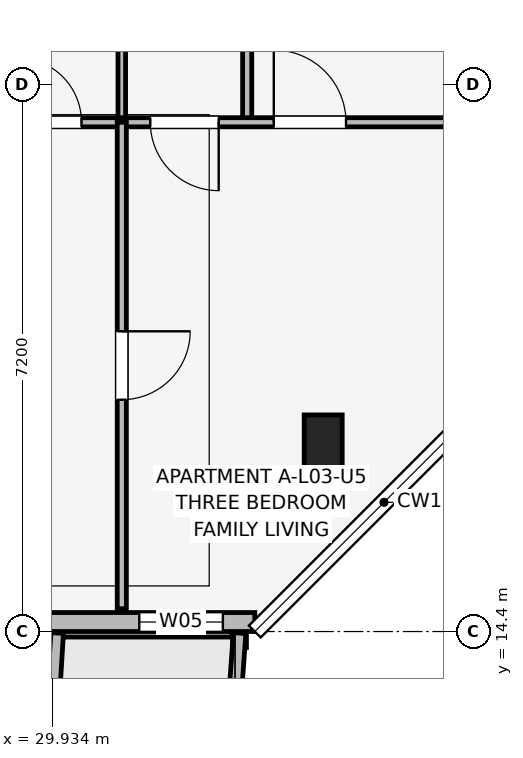
"""IFC4 building model, lengths in metres.
Left out: names, types, materials, properties, quantities, classifications, styles, units other than length and angle.
Written with IfcOpenShell. Run it as: python <this file> out.ifc"""

import sys

from ifc_helpers import new_model, si_unit, direction, frame, frame_2d, origin, origin_2d, place, context, subcontext, project, spatial, rectangle, extrude, element, fill, save


model = new_model("IFC4")
c1 = context("Model", 3, precision=1e-05, world=origin(), true_north=direction((0.0, 1.0)))
c2 = subcontext(c1, "Body", "Model", "MODEL_VIEW")
j1 = project(units=[si_unit("LENGTHUNIT", "METRE"), si_unit("PLANEANGLEUNIT", "RADIAN")], contexts=[c1])
p1 = place(None, origin())
s1 = spatial("IfcSite", under=j1, at=p1, CompositionType="ELEMENT")
p2 = place(p1, origin())
s2 = spatial("IfcBuilding", under=s1, at=p2, CompositionType="ELEMENT")
p3 = place(p2, frame((0.0, 0.0, 11.85)))
s3 = spatial("IfcBuildingStorey", under=s2, at=p3, CompositionType="ELEMENT", Elevation=11.85)
p4 = place(p3, frame((33.5, 16.9, 0.0), z_axis=(0.0, 0.0, 1.0), x_axis=(1.0, 0.0, 0.0)))
e1 = element("IfcColumn", 1, at=p4, inside=s3, PredefinedType="COLUMN", context=c2, shape_type="SweptSolid", body=[
    extrude(rectangle(XDim=0.5, YDim=0.7, at=origin_2d()), origin(), (0.0, 0.0, 1.0), 3.15),
])
p5 = place(p3, frame((3.4, 14.525, 0.0), z_axis=(0.0, 0.0, 1.0), x_axis=(1.0, 0.0, 0.0)))
e2 = element("IfcWall", 2, at=p5, inside=s3, PredefinedType="SOLIDWALL", context=c2, shape_type="SweptSolid", body=[
    extrude(rectangle(XDim=29.2, YDim=0.25, at=frame_2d((14.6, 0.0))), origin(), (0.0, 0.0, 1.0), 2.43),
])
p6 = place(p5, frame((9.5, 0.0, 0.0), z_axis=(0.0, 0.0, 1.0), x_axis=(-1.0, 0.0, 0.0)))
e3 = element("IfcOpeningElement", 3, at=p6, cuts=e2, PredefinedType="OPENING", context=c2, shape_type="SweptSolid", body=[
    extrude(rectangle(XDim=1.8, YDim=2.15, at=frame_2d((0.9, 1.075))), frame((0.0, 0.135, 0.0), z_axis=(0.0, -1.0, 0.0), x_axis=(1.0, 0.0, 0.0)), (0.0, 0.0, 1.0), 0.27),
])
p7 = place(p5, frame((23.825, 0.0, 0.0), z_axis=(0.0, 0.0, 1.0), x_axis=(-1.0, 0.0, 0.0)))
e4 = element("IfcOpeningElement", 4, at=p7, cuts=e2, PredefinedType="OPENING", context=c2, shape_type="SweptSolid", body=[
    extrude(rectangle(XDim=1.65, YDim=2.15, at=frame_2d((0.825, 1.075))), frame((0.0, 0.135, 0.0), z_axis=(0.0, -1.0, 0.0), x_axis=(1.0, 0.0, 0.0)), (0.0, 0.0, 1.0), 0.27),
])
p8 = place(p5, frame((2.755, 0.0, 0.75)))
e5 = element("IfcOpeningElement", 5, at=p8, cuts=e2, PredefinedType="OPENING", context=c2, shape_type="SweptSolid", body=[
    extrude(rectangle(XDim=0.6, YDim=1.25, at=frame_2d((0.3, 0.625))), frame((0.0, 0.135, 0.0), z_axis=(0.0, -1.0, 0.0), x_axis=(1.0, 0.0, 0.0)), (0.0, 0.0, 1.0), 0.27),
])
p9 = place(p5, frame((4.245, 0.0, 0.75)))
e6 = element("IfcOpeningElement", 6, at=p9, cuts=e2, PredefinedType="OPENING", context=c2, shape_type="SweptSolid", body=[
    extrude(rectangle(XDim=0.6, YDim=1.25, at=frame_2d((0.3, 0.625))), frame((0.0, 0.135, 0.0), z_axis=(0.0, -1.0, 0.0), x_axis=(1.0, 0.0, 0.0)), (0.0, 0.0, 1.0), 0.27),
])
p10 = place(p5, frame((12.54, 0.0, 0.7)))
e7 = element("IfcOpeningElement", 7, at=p10, cuts=e2, PredefinedType="OPENING", context=c2, shape_type="SweptSolid", body=[
    extrude(rectangle(XDim=1.72, YDim=1.6, at=frame_2d((0.86, 0.8))), frame((0.0, 0.135, 0.0), z_axis=(0.0, -1.0, 0.0), x_axis=(1.0, 0.0, 0.0)), (0.0, 0.0, 1.0), 0.27),
])
p11 = place(p5, frame((15.765, 0.0, 0.75)))
e8 = element("IfcOpeningElement", 8, at=p11, cuts=e2, PredefinedType="OPENING", context=c2, shape_type="SweptSolid", body=[
    extrude(rectangle(XDim=0.72, YDim=1.35, at=frame_2d((0.36, 0.675))), frame((0.0, 0.135, 0.0), z_axis=(0.0, -1.0, 0.0), x_axis=(1.0, 0.0, 0.0)), (0.0, 0.0, 1.0), 0.27),
])
p12 = place(p5, frame((19.555, 0.0, 0.75)))
e9 = element("IfcOpeningElement", 9, at=p12, cuts=e2, PredefinedType="OPENING", context=c2, shape_type="SweptSolid", body=[
    extrude(rectangle(XDim=0.72, YDim=1.35, at=frame_2d((0.36, 0.675))), frame((0.0, 0.135, 0.0), z_axis=(0.0, -1.0, 0.0), x_axis=(1.0, 0.0, 0.0)), (0.0, 0.0, 1.0), 0.27),
])
p13 = place(p5, frame((25.845, 0.0, 0.75)))
e10 = element("IfcOpeningElement", 10, at=p13, cuts=e2, PredefinedType="OPENING", context=c2, shape_type="SweptSolid", body=[
    extrude(rectangle(XDim=0.6, YDim=1.25, at=frame_2d((0.3, 0.625))), frame((0.0, 0.135, 0.0), z_axis=(0.0, -1.0, 0.0), x_axis=(1.0, 0.0, 0.0)), (0.0, 0.0, 1.0), 0.27),
])
p14 = place(p5, frame((27.68, 0.0, 0.75)))
e11 = element("IfcOpeningElement", 11, at=p14, cuts=e2, PredefinedType="OPENING", context=c2, shape_type="SweptSolid", body=[
    extrude(rectangle(XDim=1.1, YDim=1.5, at=frame_2d((0.55, 0.75))), frame((0.0, 0.135, 0.0), z_axis=(0.0, -1.0, 0.0), x_axis=(1.0, 0.0, 0.0)), (0.0, 0.0, 1.0), 0.27),
])
p15 = place(p3, frame((30.0, 14.38, 0.0), z_axis=(0.0, 0.0, 1.0), x_axis=(-0.061170732449, -0.998127317276, 0.0)))
e12 = element("IfcWall", 12, at=p15, inside=s3, PredefinedType="ELEMENTEDWALL", context=c2, shape_type="SweptSolid", body=[
    extrude(rectangle(XDim=1.964, YDim=0.165, at=frame_2d((0.982, 0.0))), origin(), (0.0, 0.0, 1.0), 2.95),
])
p16 = place(p3, frame((32.4, 14.38, 0.0), z_axis=(0.0, 0.0, 1.0), x_axis=(-0.071194071069, -0.997462482625, 0.0)))
e13 = element("IfcWall", 13, at=p16, inside=s3, PredefinedType="ELEMENTEDWALL", context=c2, shape_type="SweptSolid", body=[
    extrude(rectangle(XDim=1.965, YDim=0.165, at=frame_2d((0.982, 0.0))), origin(), (0.0, 0.0, 1.0), 2.95),
])
p17 = place(p3, frame((30.85, 21.1, 0.0), z_axis=(0.0, 0.0, 1.0), x_axis=(0.0, 1.0, 0.0)))
e14 = element("IfcWall", 14, at=p17, inside=s3, PredefinedType="PARTITIONING", context=c2, shape_type="SweptSolid", body=[
    extrude(rectangle(XDim=3.2, YDim=0.1, at=frame_2d((1.6, 0.0))), origin(), (0.0, 0.0, 1.0), 2.375),
])
p18 = place(p3, frame((32.5, 21.1, 0.0), z_axis=(0.0, 0.0, 1.0), x_axis=(0.0, 1.0, 0.0)))
e15 = element("IfcWall", 15, at=p18, inside=s3, PredefinedType="PARTITIONING", context=c2, shape_type="SweptSolid", body=[
    extrude(rectangle(XDim=3.2, YDim=0.12, at=frame_2d((1.6, 0.0))), origin(), (0.0, 0.0, 1.0), 2.375),
])
p19 = place(p3, frame((28.94, 21.1, 0.0), z_axis=(0.0, 0.0, 1.0), x_axis=(1.0, 0.0, 0.0)))
e16 = element("IfcWall", 16, at=p19, inside=s3, PredefinedType="PARTITIONING", context=c2, shape_type="SweptSolid", body=[
    extrude(rectangle(XDim=6.92, YDim=0.12, at=frame_2d((3.46, 0.0))), origin(), (0.0, 0.0, 1.0), 2.38),
])
p20 = place(p19, frame((0.53, 0.0, 0.0)))
e17 = element("IfcOpeningElement", 17, at=p20, cuts=e16, PredefinedType="OPENING", context=c2, shape_type="SweptSolid", body=[
    extrude(rectangle(XDim=0.85, YDim=2.08, at=frame_2d((0.425, 1.04))), frame((0.0, 0.07, 0.0), z_axis=(0.0, -1.0, 0.0), x_axis=(1.0, 0.0, 0.0)), (0.0, 0.0, 1.0), 0.14),
])
p21 = place(p19, frame((3.185, 0.0, 0.0), z_axis=(0.0, 0.0, 1.0), x_axis=(-1.0, 0.0, 0.0)))
e18 = element("IfcOpeningElement", 18, at=p21, cuts=e16, PredefinedType="OPENING", context=c2, shape_type="SweptSolid", body=[
    extrude(rectangle(XDim=0.9, YDim=2.08, at=frame_2d((0.45, 1.04))), frame((0.0, 0.07, 0.0), z_axis=(0.0, -1.0, 0.0), x_axis=(1.0, 0.0, 0.0)), (0.0, 0.0, 1.0), 0.14),
])
p22 = place(p19, frame((3.91, 0.0, 0.0)))
e19 = element("IfcOpeningElement", 19, at=p22, cuts=e16, PredefinedType="OPENING", context=c2, shape_type="SweptSolid", body=[
    extrude(rectangle(XDim=0.95, YDim=2.08, at=frame_2d((0.475, 1.04))), frame((0.0, 0.07, 0.0), z_axis=(0.0, -1.0, 0.0), x_axis=(1.0, 0.0, 0.0)), (0.0, 0.0, 1.0), 0.14),
])
p23 = place(p3, frame((30.85, 14.7, 0.0), z_axis=(0.0, 0.0, 1.0), x_axis=(0.0, 1.0, 0.0)))
e20 = element("IfcWall", 20, at=p23, inside=s3, PredefinedType="PARTITIONING", context=c2, shape_type="SweptSolid", body=[
    extrude(rectangle(XDim=6.4, YDim=0.12, at=frame_2d((3.2, 0.0))), origin(), (0.0, 0.0, 1.0), 2.38),
])
p24 = place(p23, frame((3.65, 0.0, 0.0), z_axis=(0.0, 0.0, 1.0), x_axis=(-1.0, 0.0, 0.0)))
e21 = element("IfcOpeningElement", 21, at=p24, cuts=e20, PredefinedType="OPENING", context=c2, shape_type="SweptSolid", body=[
    extrude(rectangle(XDim=0.9, YDim=2.08, at=frame_2d((0.45, 1.04))), frame((0.0, 0.07, 0.0), z_axis=(0.0, -1.0, 0.0), x_axis=(1.0, 0.0, 0.0)), (0.0, 0.0, 1.0), 0.14),
])
p25 = place(p14, origin())
e22 = element("IfcWindow", 22, at=p25, inside=s3, PartitioningType="SINGLE_PANEL", PredefinedType="WINDOW", context=c2, shape_type="SweptSolid", body=[
    extrude(rectangle(XDim=1.1, YDim=1.5, at=frame_2d((0.55, 0.75))), frame((0.0, 0.03, 0.0), z_axis=(0.0, -1.0, 0.0), x_axis=(1.0, 0.0, 0.0)), (0.0, 0.0, 1.0), 0.06),
])
fill(e11, e22)
p26 = place(p20, origin())
e23 = element("IfcDoor", 23, at=p26, inside=s3, OperationType="SINGLE_SWING_LEFT", PredefinedType="DOOR", context=c2, shape_type="SweptSolid", body=[
    extrude(rectangle(XDim=0.85, YDim=2.08, at=frame_2d((0.425, 1.04))), frame((0.0, 0.025, 0.0), z_axis=(0.0, -1.0, 0.0), x_axis=(1.0, 0.0, 0.0)), (0.0, 0.0, 1.0), 0.05),
])
fill(e17, e23)
p27 = place(p21, origin())
e24 = element("IfcDoor", 24, at=p27, inside=s3, OperationType="SINGLE_SWING_RIGHT", PredefinedType="DOOR", context=c2, shape_type="SweptSolid", body=[
    extrude(rectangle(XDim=0.9, YDim=2.08, at=frame_2d((0.45, 1.04))), frame((0.0, 0.025, 0.0), z_axis=(0.0, -1.0, 0.0), x_axis=(1.0, 0.0, 0.0)), (0.0, 0.0, 1.0), 0.05),
])
fill(e18, e24)
p28 = place(p22, origin())
e25 = element("IfcDoor", 25, at=p28, inside=s3, OperationType="SINGLE_SWING_LEFT", PredefinedType="DOOR", context=c2, shape_type="SweptSolid", body=[
    extrude(rectangle(XDim=0.95, YDim=2.08, at=frame_2d((0.475, 1.04))), frame((0.0, 0.025, 0.0), z_axis=(0.0, -1.0, 0.0), x_axis=(1.0, 0.0, 0.0)), (0.0, 0.0, 1.0), 0.05),
])
fill(e19, e25)
p29 = place(p24, origin())
e26 = element("IfcDoor", 26, at=p29, inside=s3, OperationType="SINGLE_SWING_RIGHT", PredefinedType="DOOR", context=c2, shape_type="SweptSolid", body=[
    extrude(rectangle(XDim=0.9, YDim=2.08, at=frame_2d((0.45, 1.04))), frame((0.0, 0.025, 0.0), z_axis=(0.0, -1.0, 0.0), x_axis=(1.0, 0.0, 0.0)), (0.0, 0.0, 1.0), 0.05),
])
fill(e21, e26)
save(model, sys.argv[1])
